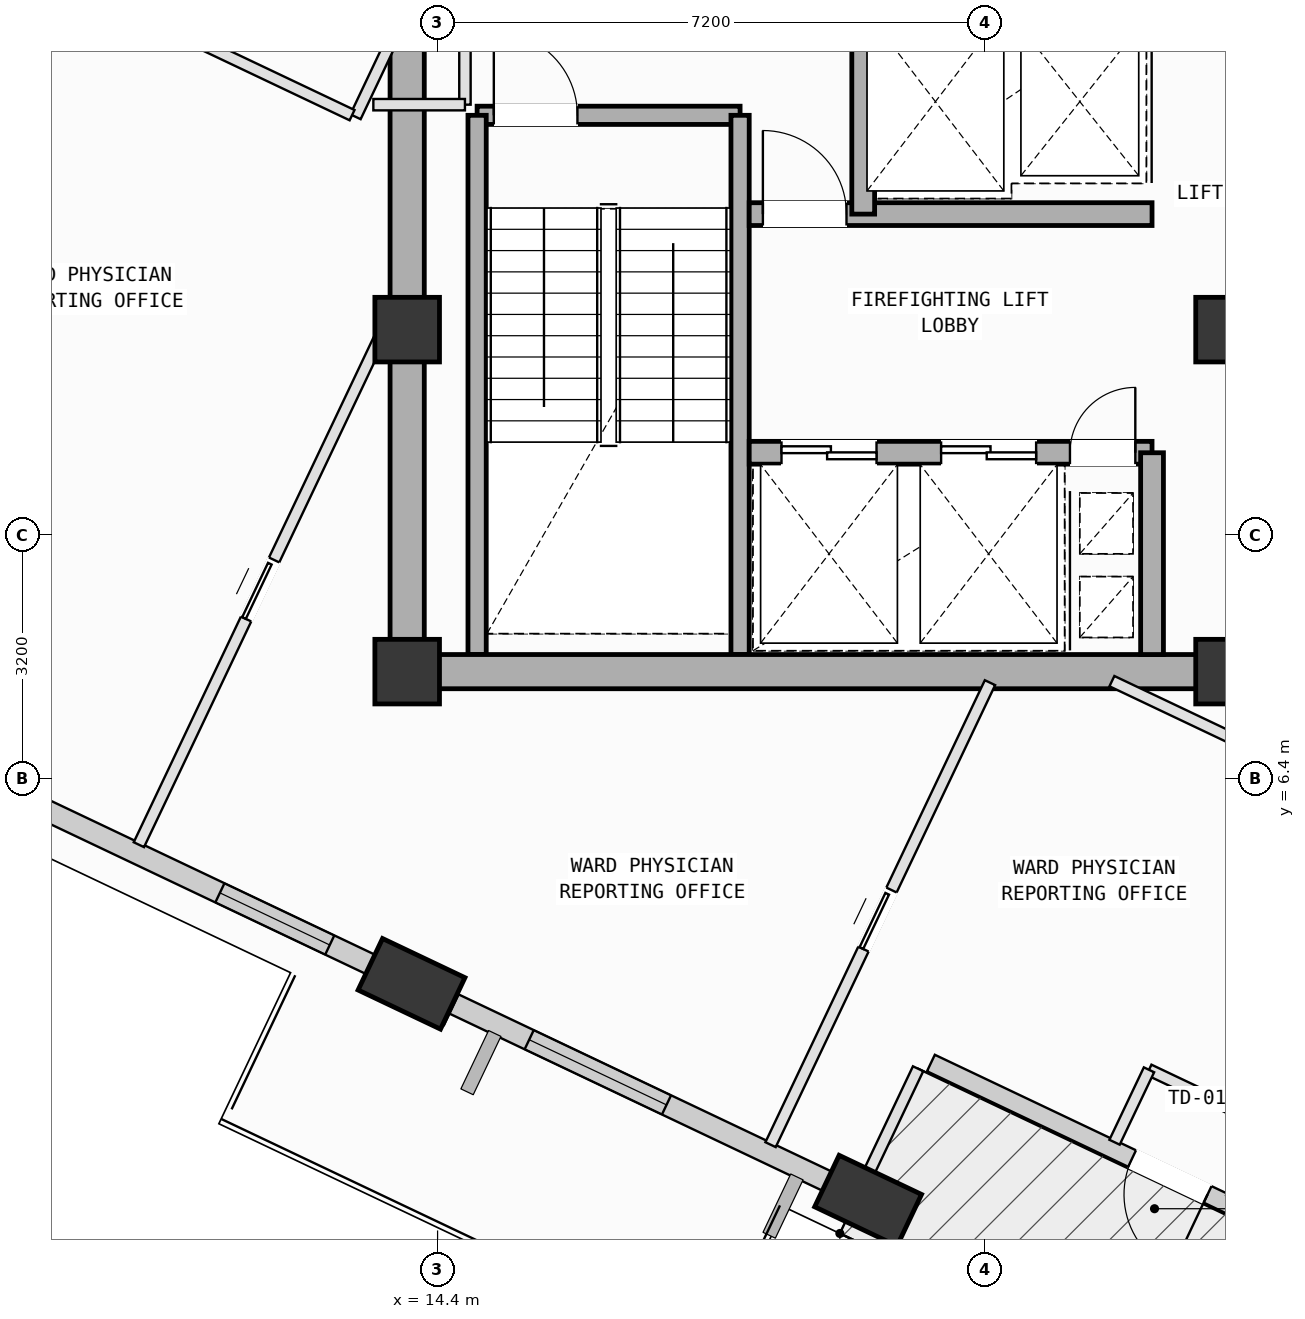
"""IFC4 building model, lengths in metres.
Left out: names, types, materials, properties, quantities, classifications, styles, units other than length and angle.
Written with IfcOpenShell. Run it as: python <this file> out.ifc"""

import sys

from ifc_helpers import new_model, si_unit, direction, frame, frame_2d, origin, origin_2d, place, context, subcontext, project, spatial, rectangle, extrude, element, fill, save


model = new_model("IFC4")
c1 = context("Model", 3, precision=1e-05, world=origin(), true_north=direction((0.0, 1.0)))
c2 = subcontext(c1, "Body", "Model", "MODEL_VIEW")
j1 = project(units=[si_unit("LENGTHUNIT", "METRE"), si_unit("PLANEANGLEUNIT", "RADIAN")], contexts=[c1])
p1 = place(None, origin())
s1 = spatial("IfcSite", under=j1, at=p1, CompositionType="ELEMENT")
p2 = place(p1, origin())
s2 = spatial("IfcBuilding", under=s1, at=p2, CompositionType="ELEMENT")
p3 = place(p2, frame((0.0, 0.0, 300.6)))
s3 = spatial("IfcBuildingStorey", under=s2, at=p3, CompositionType="ELEMENT", Elevation=300.6)
for number, where, z_axis, x_axis in (
    (1, (14.0, 7.8, 0.0), (0.0, 0.0, 1.0), (1.0, 0.0, 0.0)),
    (2, (14.0, 12.3, 0.0), (0.0, 0.0, 1.0), (1.0, 0.0, 0.0)),
    (3, (24.8, 7.8, 0.0), (0.0, 0.0, 1.0), (1.0, 0.0, 0.0)),
    (4, (24.8, 12.3, 0.0), (0.0, 0.0, 1.0), (1.0, 0.0, 0.0)),
):
    element("IfcColumn", number, at=place(p3, frame(where, z_axis=z_axis, x_axis=x_axis)), inside=s3, PredefinedType="COLUMN", context=c2, shape_type="SweptSolid", body=[
        extrude(rectangle(XDim=0.85, YDim=0.85, at=origin_2d()), origin(), (0.0, 0.0, 1.0), 4.0),
    ])
p4 = place(p3, frame((14.057, 3.692, 0.002), z_axis=(0.087534479308, -0.079709151636, 0.992967353984), x_axis=(-0.923118910106, -0.38114665119, 0.050780981588)))
e5 = element("IfcColumn", 5, at=p4, inside=s3, PredefinedType="COLUMN", context=c2, shape_type="SweptSolid", body=[
    extrude(rectangle(XDim=1.2, YDim=0.75, at=origin_2d()), origin(), (0.0, 0.0, 1.0), 4.025),
])
p5 = place(p3, frame((20.064, 0.84, 0.002), z_axis=(0.0991191026, -0.054931284662, 0.993558230536), x_axis=(-0.810633069732, -0.583533442559, 0.04860810296)))
e6 = element("IfcColumn", 6, at=p5, inside=s3, PredefinedType="COLUMN", context=c2, shape_type="SweptSolid", body=[
    extrude(rectangle(XDim=1.2, YDim=0.75, at=origin_2d()), origin(), (0.0, 0.0, 1.0), 4.022),
])
p6 = place(p3, frame((27.178, -0.335, 0.0), z_axis=(0.0, 0.0, 1.0), x_axis=(-0.903341048246, 0.428923012385, 0.0)))
e7 = element("IfcWall", 7, at=p6, inside=s3, PredefinedType="SOLIDWALL", context=c2, shape_type="SweptSolid", body=[
    extrude(rectangle(XDim=6.96, YDim=0.24, at=frame_2d((3.48, 0.0))), origin(), (0.0, 0.0, 1.0), 3.265),
])
p7 = place(p6, frame((2.93, 0.0, 0.0)))
e8 = element("IfcOpeningElement", 8, at=p7, cuts=e7, PredefinedType="OPENING", context=c2, shape_type="SweptSolid", body=[
    extrude(rectangle(XDim=1.1, YDim=2.15, at=frame_2d((0.55, 1.075))), frame((0.0, 0.13, 0.0), z_axis=(0.0, -1.0, 0.0), x_axis=(1.0, 0.0, 0.0)), (0.0, 0.0, 1.0), 0.26),
])
p8 = place(p3, frame((13.909, 3.762, 0.0), z_axis=(0.0, 0.0, 1.0), x_axis=(-0.903329022503, 0.428948338503, 0.0)))
e9 = element("IfcWall", 9, at=p8, inside=s3, PredefinedType="SOLIDWALL", context=c2, shape_type="SweptSolid", body=[
    extrude(rectangle(XDim=5.831, YDim=0.28, at=frame_2d((2.915, 0.0))), origin(), (0.0, 0.0, 1.0), 3.265),
])
p9 = place(p8, frame((1.028, 0.0, 0.75)))
e10 = element("IfcOpeningElement", 10, at=p9, cuts=e9, PredefinedType="OPENING", context=c2, shape_type="SweptSolid", body=[
    extrude(rectangle(XDim=1.6, YDim=1.95, at=frame_2d((0.8, 0.975))), frame((0.0, 0.15, 0.0), z_axis=(0.0, -1.0, 0.0), x_axis=(1.0, 0.0, 0.0)), (0.0, 0.0, 1.0), 0.3),
])
p10 = place(p3, frame((19.766, 0.981, 0.0), z_axis=(0.0, 0.0, 1.0), x_axis=(-0.903338909566, 0.428927516561, 0.0)))
e11 = element("IfcWall", 11, at=p10, inside=s3, PredefinedType="SOLIDWALL", context=c2, shape_type="SweptSolid", body=[
    extrude(rectangle(XDim=5.7, YDim=0.28, at=frame_2d((2.85, 0.0))), origin(), (0.0, 0.0, 1.0), 3.245),
])
p11 = place(p10, frame((2.606, 0.0, 0.75)))
e12 = element("IfcOpeningElement", 12, at=p11, cuts=e11, PredefinedType="OPENING", context=c2, shape_type="SweptSolid", body=[
    extrude(rectangle(XDim=2.0, YDim=1.95, at=frame_2d((1.0, 0.975))), frame((0.0, 0.15, 0.0), z_axis=(0.0, -1.0, 0.0), x_axis=(1.0, 0.0, 0.0)), (0.0, 0.0, 1.0), 0.3),
])
p12 = place(p3, frame((14.92, 15.12, 0.0), z_axis=(0.0, 0.0, 1.0), x_axis=(1.0, 0.0, 0.0)))
e13 = element("IfcWall", 13, at=p12, inside=s3, PredefinedType="SOLIDWALL", context=c2, shape_type="SweptSolid", body=[
    extrude(rectangle(XDim=3.46, YDim=0.24, at=frame_2d((1.73, 0.0))), origin(), (0.0, 0.0, 1.0), 3.78),
])
p13 = place(p12, frame((0.22, 0.0, 0.0)))
e14 = element("IfcOpeningElement", 14, at=p13, cuts=e13, PredefinedType="OPENING", context=c2, shape_type="SweptSolid", body=[
    extrude(rectangle(XDim=1.1, YDim=2.15, at=frame_2d((0.55, 1.075))), frame((0.0, 0.13, 0.0), z_axis=(0.0, -1.0, 0.0), x_axis=(1.0, 0.0, 0.0)), (0.0, 0.0, 1.0), 0.26),
])
for number, where, z_axis, x_axis in (
    (15, (18.38, 15.12, 0.0), (0.0, 0.0, 1.0), (0.0, -1.0, 0.0)),
    (16, (14.92, 8.025, 0.0), (0.0, 0.0, 1.0), (0.0, 1.0, 0.0)),
):
    element("IfcWall", number, at=place(p3, frame(where, z_axis=z_axis, x_axis=x_axis)), inside=s3, PredefinedType="SOLIDWALL", context=c2, shape_type="SweptSolid", body=[
        extrude(rectangle(XDim=7.095, YDim=0.24, at=frame_2d((3.548, 0.0))), origin(), (0.0, 0.0, 1.0), 3.78),
    ])
p14 = place(p3, frame((14.0, 7.8, 0.0), z_axis=(0.0, 0.0, 1.0), x_axis=(1.0, 0.0, 0.0)))
e17 = element("IfcWall", 17, at=p14, inside=s3, PredefinedType="SHEAR", context=c2, shape_type="SweptSolid", body=[
    extrude(rectangle(XDim=10.8, YDim=0.45, at=frame_2d((5.4, 0.0))), origin(), (0.0, 0.0, 1.0), 3.78),
])
p15 = place(p3, frame((14.0, 16.8, 0.0), z_axis=(0.0, 0.0, 1.0), x_axis=(0.0, -1.0, 0.0)))
e18 = element("IfcWall", 18, at=p15, inside=s3, PredefinedType="SHEAR", context=c2, shape_type="SweptSolid", body=[
    extrude(rectangle(XDim=9.0, YDim=0.45, at=frame_2d((4.5, 0.0))), origin(), (0.0, 0.0, 1.0), 3.78),
])
p16 = place(p3, frame((18.5, 10.68, 0.0), z_axis=(0.0, 0.0, 1.0), x_axis=(1.0, 0.0, 0.0)))
e19 = element("IfcWall", 19, at=p16, inside=s3, PredefinedType="SOLIDWALL", context=c2, shape_type="SweptSolid", body=[
    extrude(rectangle(XDim=5.3, YDim=0.3, at=frame_2d((2.65, 0.0))), origin(), (0.0, 0.0, 1.0), 3.78),
])
p17 = place(p16, frame((4.22, 0.0, 0.0)))
e20 = element("IfcOpeningElement", 20, at=p17, cuts=e19, PredefinedType="OPENING", context=c2, shape_type="SweptSolid", body=[
    extrude(rectangle(XDim=0.86, YDim=2.06, at=frame_2d((0.43, 1.03))), frame((0.0, 0.16, 0.0), z_axis=(0.0, -1.0, 0.0), x_axis=(1.0, 0.0, 0.0)), (0.0, 0.0, 1.0), 0.32),
])
p18 = place(p16, frame((0.425, 0.0, 0.0)))
e21 = element("IfcOpeningElement", 21, at=p18, cuts=e19, PredefinedType="OPENING", context=c2, shape_type="SweptSolid", body=[
    extrude(rectangle(XDim=1.25, YDim=2.18, at=frame_2d((0.625, 1.09))), frame((0.0, 0.16, 0.0), z_axis=(0.0, -1.0, 0.0), x_axis=(1.0, 0.0, 0.0)), (0.0, 0.0, 1.0), 0.32),
])
p19 = place(p16, frame((2.525, 0.0, 0.0)))
e22 = element("IfcOpeningElement", 22, at=p19, cuts=e19, PredefinedType="OPENING", context=c2, shape_type="SweptSolid", body=[
    extrude(rectangle(XDim=1.25, YDim=2.18, at=frame_2d((0.625, 1.09))), frame((0.0, 0.16, 0.0), z_axis=(0.0, -1.0, 0.0), x_axis=(1.0, 0.0, 0.0)), (0.0, 0.0, 1.0), 0.32),
])
p20 = place(p3, frame((18.5, 13.82, 0.0), z_axis=(0.0, 0.0, 1.0), x_axis=(1.0, 0.0, 0.0)))
e23 = element("IfcWall", 23, at=p20, inside=s3, PredefinedType="SOLIDWALL", context=c2, shape_type="SweptSolid", body=[
    extrude(rectangle(XDim=5.3, YDim=0.3, at=frame_2d((2.65, 0.0))), origin(), (0.0, 0.0, 1.0), 3.78),
])
p21 = place(p20, frame((0.18, 0.0, 0.0)))
e24 = element("IfcOpeningElement", 24, at=p21, cuts=e23, PredefinedType="OPENING", context=c2, shape_type="SweptSolid", body=[
    extrude(rectangle(XDim=1.1, YDim=2.15, at=frame_2d((0.55, 1.075))), frame((0.0, 0.16, 0.0), z_axis=(0.0, -1.0, 0.0), x_axis=(1.0, 0.0, 0.0)), (0.0, 0.0, 1.0), 0.32),
])
p22 = place(p3, frame((23.8, 8.025, 0.0), z_axis=(0.0, 0.0, 1.0), x_axis=(0.0, 1.0, 0.0)))
e25 = element("IfcWall", 25, at=p22, inside=s3, PredefinedType="SOLIDWALL", context=c2, shape_type="SweptSolid", body=[
    extrude(rectangle(XDim=2.655, YDim=0.3, at=frame_2d((1.328, 0.0))), origin(), (0.0, 0.0, 1.0), 3.78),
])
p23 = place(p3, frame((20.0, 13.82, 0.0), z_axis=(0.0, 0.0, 1.0), x_axis=(0.0, 1.0, 0.0)))
e26 = element("IfcWall", 26, at=p23, inside=s3, PredefinedType="SOLIDWALL", context=c2, shape_type="SweptSolid", body=[
    extrude(rectangle(XDim=2.73, YDim=0.3, at=frame_2d((1.365, 0.0))), origin(), (0.0, 0.0, 1.0), 3.78),
])
p24 = place(p3, frame((25.295, 1.832, 0.0), z_axis=(0.0, 0.0, 1.0), x_axis=(-0.903295600518, 0.429018715309, 0.0)))
e27 = element("IfcWall", 27, at=p24, inside=s3, PredefinedType="PARTITIONING", context=c2, shape_type="SweptSolid", body=[
    extrude(rectangle(XDim=1.699, YDim=0.15, at=frame_2d((0.85, 0.0))), origin(), (0.0, 0.0, 1.0), 3.78),
])
p25 = place(p3, frame((23.76, 2.561, 0.0), z_axis=(0.0, 0.0, 1.0), x_axis=(-0.429358789068, -0.903134004592, 0.0)))
e28 = element("IfcWall", 28, at=p25, inside=s3, PredefinedType="PARTITIONING", context=c2, shape_type="SweptSolid", body=[
    extrude(rectangle(XDim=1.055, YDim=0.15, at=frame_2d((0.528, 0.0))), origin(), (0.0, 0.0, 1.0), 3.78),
])
p26 = place(p3, frame((20.722, 2.575, 0.0), z_axis=(0.0, 0.0, 1.0), x_axis=(-0.428807781421, -0.90339575303, 0.0)))
e29 = element("IfcWall", 29, at=p26, inside=s3, PredefinedType="PARTITIONING", context=c2, shape_type="SweptSolid", body=[
    extrude(rectangle(XDim=2.08, YDim=0.15, at=frame_2d((1.04, 0.0))), origin(), (0.0, 0.0, 1.0), 3.78),
])
p27 = place(p3, frame((18.781, 1.576, 0.0), z_axis=(0.0, 0.0, 1.0), x_axis=(0.428982814931, 0.903312650467, 0.0)))
e30 = element("IfcWall", 30, at=p27, inside=s3, PredefinedType="PARTITIONING", context=c2, shape_type="SweptSolid", body=[
    extrude(rectangle(XDim=6.73, YDim=0.15, at=frame_2d((3.365, 0.0))), origin(), (0.0, 0.0, 1.0), 3.78),
])
p28 = place(p27, frame((2.849, 0.0, 0.0)))
e31 = element("IfcOpeningElement", 31, at=p28, cuts=e30, PredefinedType="OPENING", context=c2, shape_type="SweptSolid", body=[
    extrude(rectangle(XDim=0.86, YDim=2.06, at=frame_2d((0.43, 1.03))), frame((0.0, 0.085, 0.0), z_axis=(0.0, -1.0, 0.0), x_axis=(1.0, 0.0, 0.0)), (0.0, 0.0, 1.0), 0.17),
])
p29 = place(p3, frame((23.272, 7.675, 0.0), z_axis=(0.0, 0.0, 1.0), x_axis=(0.903279475918, -0.429052663882, 0.0)))
e32 = element("IfcWall", 32, at=p29, inside=s3, PredefinedType="PARTITIONING", context=c2, shape_type="SweptSolid", body=[
    extrude(rectangle(XDim=4.799, YDim=0.15, at=frame_2d((2.399, 0.0))), origin(), (0.0, 0.0, 1.0), 3.78),
])
p30 = place(p3, frame((14.518, 3.219, 0.0), z_axis=(0.0, 0.0, 1.0), x_axis=(-0.903712421024, 0.428140000568, 0.0)))
e33 = element("IfcWall", 33, at=p30, inside=s3, PredefinedType="PARTITIONING", context=c2, shape_type="SweptSolid", body=[
    extrude(rectangle(XDim=0.782, YDim=0.15, at=frame_2d((0.391, 0.0))), origin(), (0.0, 0.0, 1.0), 3.245),
])
p31 = place(p3, frame((10.47, 5.523, 0.0), z_axis=(0.0, 0.0, 1.0), x_axis=(0.42903605121, 0.903287366657, 0.0)))
e34 = element("IfcWall", 34, at=p31, inside=s3, PredefinedType="PARTITIONING", context=c2, shape_type="SweptSolid", body=[
    extrude(rectangle(XDim=7.435, YDim=0.15, at=frame_2d((3.718, 0.0))), origin(), (0.0, 0.0, 1.0), 3.78),
])
p32 = place(p31, frame((3.288, 0.0, 0.0)))
e35 = element("IfcOpeningElement", 35, at=p32, cuts=e34, PredefinedType="OPENING", context=c2, shape_type="SweptSolid", body=[
    extrude(rectangle(XDim=0.86, YDim=2.06, at=frame_2d((0.43, 1.03))), frame((0.0, 0.085, 0.0), z_axis=(0.0, -1.0, 0.0), x_axis=(1.0, 0.0, 0.0)), (0.0, 0.0, 1.0), 0.17),
])
p33 = place(p3, frame((13.8, 16.113, 0.0), z_axis=(0.0, 0.0, 1.0), x_axis=(-0.428545424875, -0.903520237083, 0.0)))
e36 = element("IfcWall", 36, at=p33, inside=s3, PredefinedType="PARTITIONING", context=c2, shape_type="SweptSolid", body=[
    extrude(rectangle(XDim=1.12, YDim=0.15, at=frame_2d((0.56, 0.0))), origin(), (0.0, 0.0, 1.0), 3.78),
])
p34 = place(p3, frame((13.275, 15.122, 0.0), z_axis=(0.0, 0.0, 1.0), x_axis=(-0.903294117812, 0.42902183712, 0.0)))
e37 = element("IfcWall", 37, at=p34, inside=s3, PredefinedType="PARTITIONING", context=c2, shape_type="SweptSolid", body=[
    extrude(rectangle(XDim=5.125, YDim=0.15, at=frame_2d((2.563, 0.0))), origin(), (0.0, 0.0, 1.0), 3.78),
])
p35 = place(p3, frame((14.76, 16.285, 0.0), z_axis=(0.0, 0.0, 1.0), x_axis=(0.0, -1.0, 0.0)))
e38 = element("IfcWall", 38, at=p35, inside=s3, PredefinedType="PARTITIONING", context=c2, shape_type="SweptSolid", body=[
    extrude(rectangle(XDim=1.025, YDim=0.15, at=frame_2d((0.512, 0.0))), origin(), (0.0, 0.0, 1.0), 3.78),
])
p36 = place(p3, frame((14.76, 15.26, 0.0), z_axis=(0.0, 0.0, 1.0), x_axis=(-1.0, 0.0, 0.0)))
e39 = element("IfcWall", 39, at=p36, inside=s3, PredefinedType="PARTITIONING", context=c2, shape_type="SweptSolid", body=[
    extrude(rectangle(XDim=1.205, YDim=0.15, at=frame_2d((0.603, 0.0))), origin(), (0.0, 0.0, 1.0), 3.78),
])
p37 = place(p7, origin())
e40 = element("IfcDoor", 40, at=p37, inside=s3, OperationType="SINGLE_SWING_LEFT", PredefinedType="DOOR", context=c2, shape_type="SweptSolid", body=[
    extrude(rectangle(XDim=1.1, YDim=2.15, at=frame_2d((0.55, 1.075))), frame((0.0, 0.025, 0.0), z_axis=(0.0, -1.0, 0.0), x_axis=(1.0, 0.0, 0.0)), (0.0, 0.0, 1.0), 0.05),
])
fill(e8, e40)
p38 = place(p9, origin())
e41 = element("IfcWindow", 41, at=p38, inside=s3, PartitioningType="SINGLE_PANEL", PredefinedType="WINDOW", context=c2, shape_type="SweptSolid", body=[
    extrude(rectangle(XDim=1.6, YDim=1.95, at=frame_2d((0.8, 0.975))), frame((0.0, 0.03, 0.0), z_axis=(0.0, -1.0, 0.0), x_axis=(1.0, 0.0, 0.0)), (0.0, 0.0, 1.0), 0.06),
])
fill(e10, e41)
p39 = place(p11, origin())
e42 = element("IfcWindow", 42, at=p39, inside=s3, PartitioningType="SINGLE_PANEL", PredefinedType="WINDOW", context=c2, shape_type="SweptSolid", body=[
    extrude(rectangle(XDim=2.0, YDim=1.95, at=frame_2d((1.0, 0.975))), frame((0.0, 0.03, 0.0), z_axis=(0.0, -1.0, 0.0), x_axis=(1.0, 0.0, 0.0)), (0.0, 0.0, 1.0), 0.06),
])
fill(e12, e42)
p40 = place(p13, origin())
e43 = element("IfcDoor", 43, at=p40, inside=s3, OperationType="SINGLE_SWING_LEFT", PredefinedType="DOOR", context=c2, shape_type="SweptSolid", body=[
    extrude(rectangle(XDim=1.1, YDim=2.15, at=frame_2d((0.55, 1.075))), frame((0.0, 0.025, 0.0), z_axis=(0.0, -1.0, 0.0), x_axis=(1.0, 0.0, 0.0)), (0.0, 0.0, 1.0), 0.05),
])
fill(e14, e43)
p41 = place(p17, origin())
e44 = element("IfcDoor", 44, at=p41, inside=s3, OperationType="SINGLE_SWING_RIGHT", PredefinedType="DOOR", context=c2, shape_type="SweptSolid", body=[
    extrude(rectangle(XDim=0.86, YDim=2.06, at=frame_2d((0.43, 1.03))), frame((0.0, 0.025, 0.0), z_axis=(0.0, -1.0, 0.0), x_axis=(1.0, 0.0, 0.0)), (0.0, 0.0, 1.0), 0.05),
])
fill(e20, e44)
p42 = place(p21, origin())
e45 = element("IfcDoor", 45, at=p42, inside=s3, OperationType="SINGLE_SWING_LEFT", PredefinedType="DOOR", context=c2, shape_type="SweptSolid", body=[
    extrude(rectangle(XDim=1.1, YDim=2.15, at=frame_2d((0.55, 1.075))), frame((0.0, 0.025, 0.0), z_axis=(0.0, -1.0, 0.0), x_axis=(1.0, 0.0, 0.0)), (0.0, 0.0, 1.0), 0.05),
])
fill(e24, e45)
p43 = place(p18, origin())
e46 = element("IfcDoor", 46, at=p43, inside=s3, OperationType="DOUBLE_DOOR_SLIDING", PredefinedType="DOOR", context=c2, shape_type="SweptSolid", body=[
    extrude(rectangle(XDim=1.25, YDim=2.18, at=frame_2d((0.625, 1.09))), frame((0.0, 0.025, 0.0), z_axis=(0.0, -1.0, 0.0), x_axis=(1.0, 0.0, 0.0)), (0.0, 0.0, 1.0), 0.05),
])
fill(e21, e46)
p44 = place(p19, origin())
e47 = element("IfcDoor", 47, at=p44, inside=s3, OperationType="DOUBLE_DOOR_SLIDING", PredefinedType="DOOR", context=c2, shape_type="SweptSolid", body=[
    extrude(rectangle(XDim=1.25, YDim=2.18, at=frame_2d((0.625, 1.09))), frame((0.0, 0.025, 0.0), z_axis=(0.0, -1.0, 0.0), x_axis=(1.0, 0.0, 0.0)), (0.0, 0.0, 1.0), 0.05),
])
fill(e22, e47)
p45 = place(p28, origin())
e48 = element("IfcDoor", 48, at=p45, inside=s3, OperationType="SLIDING_TO_LEFT", PredefinedType="DOOR", context=c2, shape_type="SweptSolid", body=[
    extrude(rectangle(XDim=0.86, YDim=2.06, at=frame_2d((0.43, 1.03))), frame((0.0, 0.025, 0.0), z_axis=(0.0, -1.0, 0.0), x_axis=(1.0, 0.0, 0.0)), (0.0, 0.0, 1.0), 0.05),
])
fill(e31, e48)
p46 = place(p32, origin())
e49 = element("IfcDoor", 49, at=p46, inside=s3, OperationType="SLIDING_TO_LEFT", PredefinedType="DOOR", context=c2, shape_type="SweptSolid", body=[
    extrude(rectangle(XDim=0.86, YDim=2.06, at=frame_2d((0.43, 1.03))), frame((0.0, 0.025, 0.0), z_axis=(0.0, -1.0, 0.0), x_axis=(1.0, 0.0, 0.0)), (0.0, 0.0, 1.0), 0.05),
])
fill(e35, e49)
save(model, sys.argv[1])
